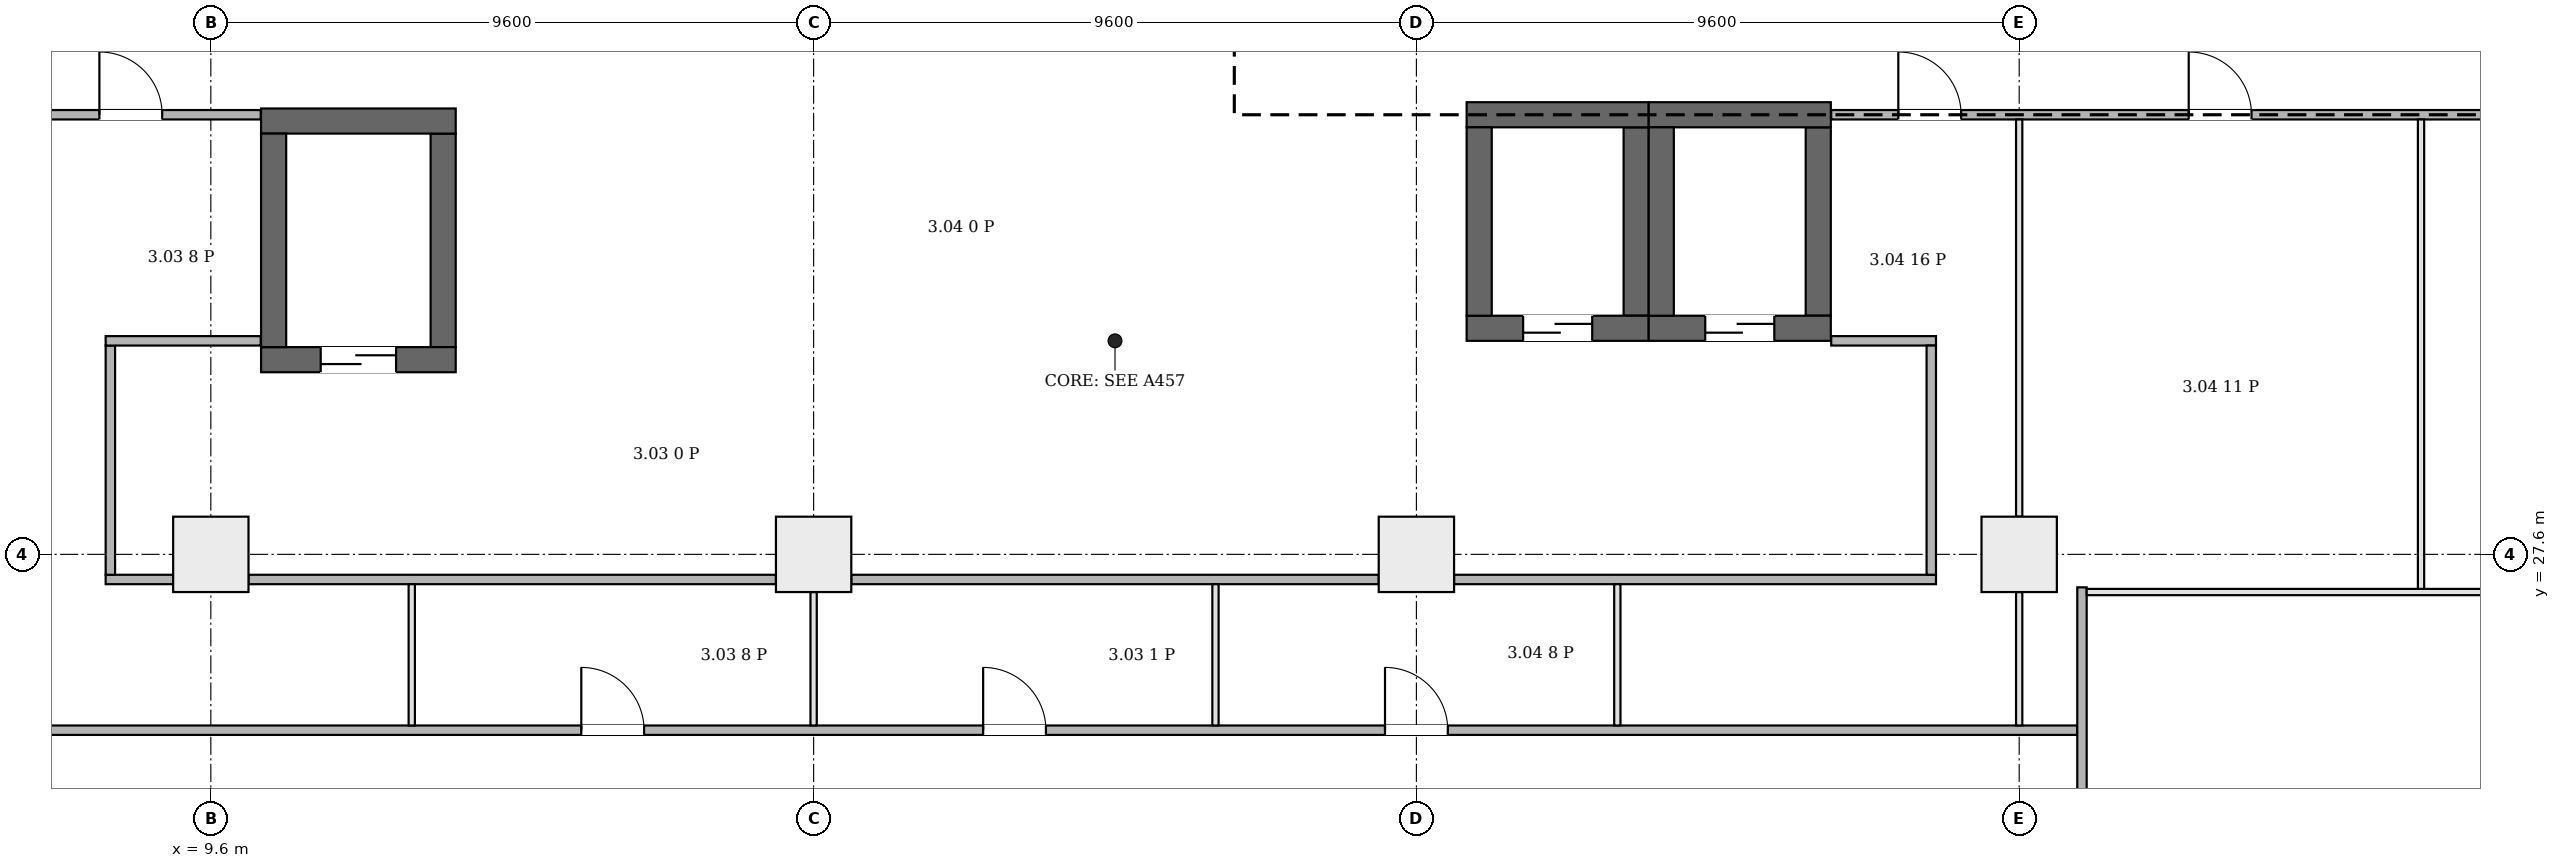
"""IFC4 building model, lengths in metres.
Left out: names, types, materials, properties, quantities, classifications, styles, units other than length and angle.
Written with IfcOpenShell. Run it as: python <this file> out.ifc"""

import sys

from ifc_helpers import new_model, si_unit, direction, frame, frame_2d, origin, origin_2d, place, context, subcontext, project, spatial, rectangle, extrude, element, fill, save


model = new_model("IFC4")
c1 = context("Model", 3, precision=1e-05, world=origin(), true_north=direction((0.0, 1.0)))
c2 = subcontext(c1, "Body", "Model", "MODEL_VIEW")
j1 = project(units=[si_unit("LENGTHUNIT", "METRE"), si_unit("PLANEANGLEUNIT", "RADIAN")], contexts=[c1])
p1 = place(None, origin())
s1 = spatial("IfcSite", under=j1, at=p1, CompositionType="ELEMENT")
p2 = place(p1, origin())
s2 = spatial("IfcBuilding", under=s1, at=p2, CompositionType="ELEMENT")
p3 = place(p2, frame((0.0, 0.0, 21.7)))
s3 = spatial("IfcBuildingStorey", under=s2, at=p3, CompositionType="ELEMENT", Elevation=21.7)
p4 = place(p3, frame((10.4, 30.7, 0.0), z_axis=(0.0, 0.0, 1.0), x_axis=(1.0, 0.0, 0.0)))
e1 = element("IfcWall", 1, at=p4, inside=s3, PredefinedType="SHEAR", context=c2, shape_type="SweptSolid", body=[
    extrude(rectangle(XDim=3.1, YDim=0.4, at=frame_2d((1.55, 0.0))), origin(), (0.0, 0.0, 1.0), 5.0),
])
p5 = place(p4, frame((0.95, 0.0, 0.0)))
e2 = element("IfcOpeningElement", 2, at=p5, cuts=e1, PredefinedType="OPENING", context=c2, shape_type="SweptSolid", body=[
    extrude(rectangle(XDim=1.2, YDim=2.1, at=frame_2d((0.6, 1.05))), frame((0.0, 0.21, 0.0), z_axis=(0.0, -1.0, 0.0), x_axis=(1.0, 0.0, 0.0)), (0.0, 0.0, 1.0), 0.42),
])
p6 = place(p3, frame((10.4, 34.5, 0.0), z_axis=(0.0, 0.0, 1.0), x_axis=(1.0, 0.0, 0.0)))
e3 = element("IfcWall", 3, at=p6, inside=s3, PredefinedType="SHEAR", context=c2, shape_type="SweptSolid", body=[
    extrude(rectangle(XDim=3.1, YDim=0.4, at=frame_2d((1.55, 0.0))), origin(), (0.0, 0.0, 1.0), 5.0),
])
for number, where, z_axis, x_axis in (
    (4, (10.6, 30.9, 0.0), (0.0, 0.0, 1.0), (0.0, 1.0, 0.0)),
    (5, (13.3, 30.9, 0.0), (0.0, 0.0, 1.0), (0.0, 1.0, 0.0)),
):
    element("IfcWall", number, at=place(p3, frame(where, z_axis=z_axis, x_axis=x_axis)), inside=s3, PredefinedType="SHEAR", context=c2, shape_type="SweptSolid", body=[
        extrude(rectangle(XDim=3.4, YDim=0.4, at=frame_2d((1.7, 0.0))), origin(), (0.0, 0.0, 1.0), 5.0),
    ])
p7 = place(p3, frame((29.6, 31.2, 0.0), z_axis=(0.0, 0.0, 1.0), x_axis=(1.0, 0.0, 0.0)))
e6 = element("IfcWall", 6, at=p7, inside=s3, PredefinedType="SHEAR", context=c2, shape_type="SweptSolid", body=[
    extrude(rectangle(XDim=2.9, YDim=0.4, at=frame_2d((1.45, 0.0))), origin(), (0.0, 0.0, 1.0), 5.0),
])
p8 = place(p7, frame((0.9, 0.0, 0.0)))
e7 = element("IfcOpeningElement", 7, at=p8, cuts=e6, PredefinedType="OPENING", context=c2, shape_type="SweptSolid", body=[
    extrude(rectangle(XDim=1.1, YDim=2.1, at=frame_2d((0.55, 1.05))), frame((0.0, 0.21, 0.0), z_axis=(0.0, -1.0, 0.0), x_axis=(1.0, 0.0, 0.0)), (0.0, 0.0, 1.0), 0.42),
])
p9 = place(p3, frame((29.6, 34.6, 0.0), z_axis=(0.0, 0.0, 1.0), x_axis=(1.0, 0.0, 0.0)))
e8 = element("IfcWall", 8, at=p9, inside=s3, PredefinedType="SHEAR", context=c2, shape_type="SweptSolid", body=[
    extrude(rectangle(XDim=2.9, YDim=0.4, at=frame_2d((1.45, 0.0))), origin(), (0.0, 0.0, 1.0), 5.0),
])
for number, where, z_axis, x_axis in (
    (9, (29.8, 31.4, 0.0), (0.0, 0.0, 1.0), (0.0, 1.0, 0.0)),
    (10, (32.3, 31.4, 0.0), (0.0, 0.0, 1.0), (0.0, 1.0, 0.0)),
):
    element("IfcWall", number, at=place(p3, frame(where, z_axis=z_axis, x_axis=x_axis)), inside=s3, PredefinedType="SHEAR", context=c2, shape_type="SweptSolid", body=[
        extrude(rectangle(XDim=3.0, YDim=0.4, at=frame_2d((1.5, 0.0))), origin(), (0.0, 0.0, 1.0), 5.0),
    ])
p10 = place(p3, frame((32.5, 31.2, 0.0), z_axis=(0.0, 0.0, 1.0), x_axis=(1.0, 0.0, 0.0)))
e11 = element("IfcWall", 11, at=p10, inside=s3, PredefinedType="SHEAR", context=c2, shape_type="SweptSolid", body=[
    extrude(rectangle(XDim=2.9, YDim=0.4, at=frame_2d((1.45, 0.0))), origin(), (0.0, 0.0, 1.0), 5.0),
])
p11 = place(p10, frame((0.9, 0.0, 0.0)))
e12 = element("IfcOpeningElement", 12, at=p11, cuts=e11, PredefinedType="OPENING", context=c2, shape_type="SweptSolid", body=[
    extrude(rectangle(XDim=1.1, YDim=2.1, at=frame_2d((0.55, 1.05))), frame((0.0, 0.21, 0.0), z_axis=(0.0, -1.0, 0.0), x_axis=(1.0, 0.0, 0.0)), (0.0, 0.0, 1.0), 0.42),
])
p12 = place(p3, frame((32.5, 34.6, 0.0), z_axis=(0.0, 0.0, 1.0), x_axis=(1.0, 0.0, 0.0)))
e13 = element("IfcWall", 13, at=p12, inside=s3, PredefinedType="SHEAR", context=c2, shape_type="SweptSolid", body=[
    extrude(rectangle(XDim=2.9, YDim=0.4, at=frame_2d((1.45, 0.0))), origin(), (0.0, 0.0, 1.0), 5.0),
])
for number, where, z_axis, x_axis in (
    (14, (32.7, 31.4, 0.0), (0.0, 0.0, 1.0), (0.0, 1.0, 0.0)),
    (15, (35.2, 31.4, 0.0), (0.0, 0.0, 1.0), (0.0, 1.0, 0.0)),
):
    element("IfcWall", number, at=place(p3, frame(where, z_axis=z_axis, x_axis=x_axis)), inside=s3, PredefinedType="SHEAR", context=c2, shape_type="SweptSolid", body=[
        extrude(rectangle(XDim=3.0, YDim=0.4, at=frame_2d((1.5, 0.0))), origin(), (0.0, 0.0, 1.0), 5.0),
    ])
for number, where, z_axis, x_axis in (
    (16, (9.6, 27.6, 0.0), (0.0, 0.0, 1.0), (1.0, 0.0, 0.0)),
    (17, (19.2, 27.6, 0.0), (0.0, 0.0, 1.0), (1.0, 0.0, 0.0)),
    (18, (28.8, 27.6, 0.0), (0.0, 0.0, 1.0), (1.0, 0.0, 0.0)),
    (19, (38.4, 27.6, 0.0), (0.0, 0.0, 1.0), (1.0, 0.0, 0.0)),
):
    element("IfcColumn", number, at=place(p3, frame(where, z_axis=z_axis, x_axis=x_axis)), inside=s3, PredefinedType="COLUMN", context=c2, shape_type="SweptSolid", body=[
        extrude(rectangle(XDim=1.2, YDim=1.2, at=origin_2d()), origin(), (0.0, 0.0, 1.0), 5.0),
    ])
p13 = place(p3, frame((0.206, 24.8, 0.0), z_axis=(0.0, 0.0, 1.0), x_axis=(1.0, 0.0, 0.0)))
e20 = element("IfcWall", 20, at=p13, inside=s3, PredefinedType="PARTITIONING", context=c2, shape_type="SweptSolid", body=[
    extrude(rectangle(XDim=39.119, YDim=0.15, at=frame_2d((19.56, 0.0))), origin(), (0.0, 0.0, 1.0), 4.65),
])
p14 = place(p13, frame((15.294, 0.0, 0.0)))
e21 = element("IfcOpeningElement", 21, at=p14, cuts=e20, PredefinedType="OPENING", context=c2, shape_type="SweptSolid", body=[
    extrude(rectangle(XDim=1.0, YDim=2.1, at=frame_2d((0.5, 1.05))), frame((0.0, 0.085, 0.0), z_axis=(0.0, -1.0, 0.0), x_axis=(1.0, 0.0, 0.0)), (0.0, 0.0, 1.0), 0.17),
])
p15 = place(p13, frame((21.694, 0.0, 0.0)))
e22 = element("IfcOpeningElement", 22, at=p15, cuts=e20, PredefinedType="OPENING", context=c2, shape_type="SweptSolid", body=[
    extrude(rectangle(XDim=1.0, YDim=2.1, at=frame_2d((0.5, 1.05))), frame((0.0, 0.085, 0.0), z_axis=(0.0, -1.0, 0.0), x_axis=(1.0, 0.0, 0.0)), (0.0, 0.0, 1.0), 0.17),
])
p16 = place(p13, frame((28.094, 0.0, 0.0)))
e23 = element("IfcOpeningElement", 23, at=p16, cuts=e20, PredefinedType="OPENING", context=c2, shape_type="SweptSolid", body=[
    extrude(rectangle(XDim=1.0, YDim=2.1, at=frame_2d((0.5, 1.05))), frame((0.0, 0.085, 0.0), z_axis=(0.0, -1.0, 0.0), x_axis=(1.0, 0.0, 0.0)), (0.0, 0.0, 1.0), 0.17),
])
p17 = place(p3, frame((2.706, 34.6, 0.0), z_axis=(0.0, 0.0, 1.0), x_axis=(1.0, 0.0, 0.0)))
e24 = element("IfcWall", 24, at=p17, inside=s3, PredefinedType="PARTITIONING", context=c2, shape_type="SweptSolid", body=[
    extrude(rectangle(XDim=7.688, YDim=0.15, at=frame_2d((3.844, 0.0))), origin(), (0.0, 0.0, 1.0), 4.65),
])
p18 = place(p17, frame((2.194, 0.0, 0.0)))
e25 = element("IfcOpeningElement", 25, at=p18, cuts=e24, PredefinedType="OPENING", context=c2, shape_type="SweptSolid", body=[
    extrude(rectangle(XDim=1.0, YDim=2.1, at=frame_2d((0.5, 1.05))), frame((0.0, 0.085, 0.0), z_axis=(0.0, -1.0, 0.0), x_axis=(1.0, 0.0, 0.0)), (0.0, 0.0, 1.0), 0.17),
])
p19 = place(p17, frame((5.119, 0.0, 0.0)))
e26 = element("IfcOpeningElement", 26, at=p19, cuts=e24, PredefinedType="OPENING", context=c2, shape_type="SweptSolid", body=[
    extrude(rectangle(XDim=1.0, YDim=2.1, at=frame_2d((0.5, 1.05))), frame((0.0, 0.085, 0.0), z_axis=(0.0, -1.0, 0.0), x_axis=(1.0, 0.0, 0.0)), (0.0, 0.0, 1.0), 0.17),
])
p20 = place(p3, frame((7.925, 27.2, 0.0), z_axis=(0.0, 0.0, 1.0), x_axis=(1.0, 0.0, 0.0)))
e27 = element("IfcWall", 27, at=p20, inside=s3, PredefinedType="PARTITIONING", context=c2, shape_type="SweptSolid", body=[
    extrude(rectangle(XDim=1.075, YDim=0.15, at=frame_2d((0.538, 0.0))), origin(), (0.0, 0.0, 1.0), 4.65),
])
p21 = place(p3, frame((8.0, 27.275, 0.0), z_axis=(0.0, 0.0, 1.0), x_axis=(0.0, 1.0, 0.0)))
e28 = element("IfcWall", 28, at=p21, inside=s3, PredefinedType="PARTITIONING", context=c2, shape_type="SweptSolid", body=[
    extrude(rectangle(XDim=3.65, YDim=0.15, at=frame_2d((1.825, 0.0))), origin(), (0.0, 0.0, 1.0), 4.65),
])
p22 = place(p3, frame((7.925, 31.0, 0.0), z_axis=(0.0, 0.0, 1.0), x_axis=(1.0, 0.0, 0.0)))
e29 = element("IfcWall", 29, at=p22, inside=s3, PredefinedType="PARTITIONING", context=c2, shape_type="SweptSolid", body=[
    extrude(rectangle(XDim=2.469, YDim=0.15, at=frame_2d((1.234, 0.0))), origin(), (0.0, 0.0, 1.0), 4.65),
])
p23 = place(p3, frame((10.2, 27.2, 0.0), z_axis=(0.0, 0.0, 1.0), x_axis=(1.0, 0.0, 0.0)))
e30 = element("IfcWall", 30, at=p23, inside=s3, PredefinedType="PARTITIONING", context=c2, shape_type="SweptSolid", body=[
    extrude(rectangle(XDim=8.4, YDim=0.15, at=frame_2d((4.2, 0.0))), origin(), (0.0, 0.0, 1.0), 4.65),
])
p24 = place(p3, frame((12.8, 24.875, 0.0), z_axis=(0.0, 0.0, 1.0), x_axis=(0.0, 1.0, 0.0)))
e31 = element("IfcWall", 31, at=p24, inside=s3, PredefinedType="PARTITIONING", context=c2, shape_type="SweptSolid", body=[
    extrude(rectangle(XDim=2.25, YDim=0.1, at=frame_2d((1.125, 0.0))), origin(), (0.0, 0.0, 1.0), 4.65),
])
p25 = place(p3, frame((19.2, 24.875, 0.0), z_axis=(0.0, 0.0, 1.0), x_axis=(0.0, 1.0, 0.0)))
e32 = element("IfcWall", 32, at=p25, inside=s3, PredefinedType="PARTITIONING", context=c2, shape_type="SweptSolid", body=[
    extrude(rectangle(XDim=2.125, YDim=0.1, at=frame_2d((1.062, 0.0))), origin(), (0.0, 0.0, 1.0), 4.25),
])
p26 = place(p3, frame((19.8, 27.2, 0.0), z_axis=(0.0, 0.0, 1.0), x_axis=(1.0, 0.0, 0.0)))
e33 = element("IfcWall", 33, at=p26, inside=s3, PredefinedType="PARTITIONING", context=c2, shape_type="SweptSolid", body=[
    extrude(rectangle(XDim=8.4, YDim=0.15, at=frame_2d((4.2, 0.0))), origin(), (0.0, 0.0, 1.0), 4.65),
])
p27 = place(p3, frame((25.6, 24.875, 0.0), z_axis=(0.0, 0.0, 1.0), x_axis=(0.0, 1.0, 0.0)))
e34 = element("IfcWall", 34, at=p27, inside=s3, PredefinedType="PARTITIONING", context=c2, shape_type="SweptSolid", body=[
    extrude(rectangle(XDim=2.25, YDim=0.1, at=frame_2d((1.125, 0.0))), origin(), (0.0, 0.0, 1.0), 4.65),
])
p28 = place(p3, frame((29.4, 27.2, 0.0), z_axis=(0.0, 0.0, 1.0), x_axis=(1.0, 0.0, 0.0)))
e35 = element("IfcWall", 35, at=p28, inside=s3, PredefinedType="PARTITIONING", context=c2, shape_type="SweptSolid", body=[
    extrude(rectangle(XDim=7.675, YDim=0.15, at=frame_2d((3.837, 0.0))), origin(), (0.0, 0.0, 1.0), 4.65),
])
p29 = place(p3, frame((32.0, 24.875, 0.0), z_axis=(0.0, 0.0, 1.0), x_axis=(0.0, 1.0, 0.0)))
e36 = element("IfcWall", 36, at=p29, inside=s3, PredefinedType="PARTITIONING", context=c2, shape_type="SweptSolid", body=[
    extrude(rectangle(XDim=2.25, YDim=0.1, at=frame_2d((1.125, 0.0))), origin(), (0.0, 0.0, 1.0), 4.65),
])
p30 = place(p3, frame((35.406, 31.0, 0.0), z_axis=(0.0, 0.0, 1.0), x_axis=(1.0, 0.0, 0.0)))
e37 = element("IfcWall", 37, at=p30, inside=s3, PredefinedType="PARTITIONING", context=c2, shape_type="SweptSolid", body=[
    extrude(rectangle(XDim=1.669, YDim=0.15, at=frame_2d((0.834, 0.0))), origin(), (0.0, 0.0, 1.0), 4.65),
])
p31 = place(p3, frame((35.406, 34.6, 0.0), z_axis=(0.0, 0.0, 1.0), x_axis=(1.0, 0.0, 0.0)))
e38 = element("IfcWall", 38, at=p31, inside=s3, PredefinedType="PARTITIONING", context=c2, shape_type="SweptSolid", body=[
    extrude(rectangle(XDim=21.988, YDim=0.15, at=frame_2d((10.994, 0.0))), origin(), (0.0, 0.0, 1.0), 4.65),
])
p32 = place(p31, frame((1.069, 0.0, 0.0)))
e39 = element("IfcOpeningElement", 39, at=p32, cuts=e38, PredefinedType="OPENING", context=c2, shape_type="SweptSolid", body=[
    extrude(rectangle(XDim=1.0, YDim=2.1, at=frame_2d((0.5, 1.05))), frame((0.0, 0.085, 0.0), z_axis=(0.0, -1.0, 0.0), x_axis=(1.0, 0.0, 0.0)), (0.0, 0.0, 1.0), 0.17),
])
p33 = place(p31, frame((5.694, 0.0, 0.0)))
e40 = element("IfcOpeningElement", 40, at=p33, cuts=e38, PredefinedType="OPENING", context=c2, shape_type="SweptSolid", body=[
    extrude(rectangle(XDim=1.0, YDim=2.1, at=frame_2d((0.5, 1.05))), frame((0.0, 0.085, 0.0), z_axis=(0.0, -1.0, 0.0), x_axis=(1.0, 0.0, 0.0)), (0.0, 0.0, 1.0), 0.17),
])
p34 = place(p31, frame((12.094, 0.0, 0.0)))
e41 = element("IfcOpeningElement", 41, at=p34, cuts=e38, PredefinedType="OPENING", context=c2, shape_type="SweptSolid", body=[
    extrude(rectangle(XDim=1.0, YDim=2.1, at=frame_2d((0.5, 1.05))), frame((0.0, 0.085, 0.0), z_axis=(0.0, -1.0, 0.0), x_axis=(1.0, 0.0, 0.0)), (0.0, 0.0, 1.0), 0.17),
])
p35 = place(p31, frame((18.318, 0.0, 0.0)))
e42 = element("IfcOpeningElement", 42, at=p35, cuts=e38, PredefinedType="OPENING", context=c2, shape_type="SweptSolid", body=[
    extrude(rectangle(XDim=1.0, YDim=2.1, at=frame_2d((0.5, 1.05))), frame((0.0, 0.085, 0.0), z_axis=(0.0, -1.0, 0.0), x_axis=(1.0, 0.0, 0.0)), (0.0, 0.0, 1.0), 0.17),
])
p36 = place(p3, frame((37.0, 27.275, 0.0), z_axis=(0.0, 0.0, 1.0), x_axis=(0.0, 1.0, 0.0)))
e43 = element("IfcWall", 43, at=p36, inside=s3, PredefinedType="PARTITIONING", context=c2, shape_type="SweptSolid", body=[
    extrude(rectangle(XDim=3.65, YDim=0.15, at=frame_2d((1.825, 0.0))), origin(), (0.0, 0.0, 1.0), 4.65),
])
p37 = place(p3, frame((38.4, 24.875, 0.0), z_axis=(0.0, 0.0, 1.0), x_axis=(0.0, 1.0, 0.0)))
e44 = element("IfcWall", 44, at=p37, inside=s3, PredefinedType="PARTITIONING", context=c2, shape_type="SweptSolid", body=[
    extrude(rectangle(XDim=2.125, YDim=0.1, at=frame_2d((1.062, 0.0))), origin(), (0.0, 0.0, 1.0), 4.25),
])
p38 = place(p3, frame((38.4, 28.2, 0.0), z_axis=(0.0, 0.0, 1.0), x_axis=(0.0, 1.0, 0.0)))
e45 = element("IfcWall", 45, at=p38, inside=s3, PredefinedType="PARTITIONING", context=c2, shape_type="SweptSolid", body=[
    extrude(rectangle(XDim=6.325, YDim=0.1, at=frame_2d((3.163, 0.0))), origin(), (0.0, 0.0, 1.0), 4.25),
])
p39 = place(p3, frame((39.4, 19.075, 0.0), z_axis=(0.0, 0.0, 1.0), x_axis=(0.0, 1.0, 0.0)))
e46 = element("IfcWall", 46, at=p39, inside=s3, PredefinedType="PARTITIONING", context=c2, shape_type="SweptSolid", body=[
    extrude(rectangle(XDim=8.0, YDim=0.15, at=frame_2d((4.0, 0.0))), origin(), (0.0, 0.0, 1.0), 4.65),
])
p40 = place(p39, frame((3.425, 0.0, 0.0)))
e47 = element("IfcOpeningElement", 47, at=p40, cuts=e46, PredefinedType="OPENING", context=c2, shape_type="SweptSolid", body=[
    extrude(rectangle(XDim=1.0, YDim=2.1, at=frame_2d((0.5, 1.05))), frame((0.0, 0.085, 0.0), z_axis=(0.0, -1.0, 0.0), x_axis=(1.0, 0.0, 0.0)), (0.0, 0.0, 1.0), 0.17),
])
p41 = place(p3, frame((39.475, 27.0, 0.0), z_axis=(0.0, 0.0, 1.0), x_axis=(1.0, 0.0, 0.0)))
e48 = element("IfcWall", 48, at=p41, inside=s3, PredefinedType="PARTITIONING", context=c2, shape_type="SweptSolid", body=[
    extrude(rectangle(XDim=7.925, YDim=0.1, at=frame_2d((3.962, 0.0))), origin(), (0.0, 0.0, 1.0), 4.65),
])
p42 = place(p3, frame((44.8, 27.05, 0.0), z_axis=(0.0, 0.0, 1.0), x_axis=(0.0, 1.0, 0.0)))
e49 = element("IfcWall", 49, at=p42, inside=s3, PredefinedType="PARTITIONING", context=c2, shape_type="SweptSolid", body=[
    extrude(rectangle(XDim=7.475, YDim=0.1, at=frame_2d((3.737, 0.0))), origin(), (0.0, 0.0, 1.0), 4.65),
])
p43 = place(p5, origin())
e50 = element("IfcDoor", 50, at=p43, inside=s3, OperationType="DOUBLE_DOOR_SLIDING", PredefinedType="DOOR", context=c2, shape_type="SweptSolid", body=[
    extrude(rectangle(XDim=1.2, YDim=2.1, at=frame_2d((0.6, 1.05))), frame((0.0, 0.025, 0.0), z_axis=(0.0, -1.0, 0.0), x_axis=(1.0, 0.0, 0.0)), (0.0, 0.0, 1.0), 0.05),
])
fill(e2, e50)
p44 = place(p8, origin())
e51 = element("IfcDoor", 51, at=p44, inside=s3, OperationType="DOUBLE_DOOR_SLIDING", PredefinedType="DOOR", context=c2, shape_type="SweptSolid", body=[
    extrude(rectangle(XDim=1.1, YDim=2.1, at=frame_2d((0.55, 1.05))), frame((0.0, 0.025, 0.0), z_axis=(0.0, -1.0, 0.0), x_axis=(1.0, 0.0, 0.0)), (0.0, 0.0, 1.0), 0.05),
])
fill(e7, e51)
p45 = place(p11, origin())
e52 = element("IfcDoor", 52, at=p45, inside=s3, OperationType="DOUBLE_DOOR_SLIDING", PredefinedType="DOOR", context=c2, shape_type="SweptSolid", body=[
    extrude(rectangle(XDim=1.1, YDim=2.1, at=frame_2d((0.55, 1.05))), frame((0.0, 0.025, 0.0), z_axis=(0.0, -1.0, 0.0), x_axis=(1.0, 0.0, 0.0)), (0.0, 0.0, 1.0), 0.05),
])
fill(e12, e52)
p46 = place(p19, origin())
e53 = element("IfcDoor", 53, at=p46, inside=s3, OperationType="SINGLE_SWING_LEFT", PredefinedType="DOOR", context=c2, shape_type="SweptSolid", body=[
    extrude(rectangle(XDim=1.0, YDim=2.1, at=frame_2d((0.5, 1.05))), frame((0.0, 0.025, 0.0), z_axis=(0.0, -1.0, 0.0), x_axis=(1.0, 0.0, 0.0)), (0.0, 0.0, 1.0), 0.05),
])
fill(e26, e53)
p47 = place(p14, origin())
e54 = element("IfcDoor", 54, at=p47, inside=s3, OperationType="SINGLE_SWING_LEFT", PredefinedType="DOOR", context=c2, shape_type="SweptSolid", body=[
    extrude(rectangle(XDim=1.0, YDim=2.1, at=frame_2d((0.5, 1.05))), frame((0.0, 0.025, 0.0), z_axis=(0.0, -1.0, 0.0), x_axis=(1.0, 0.0, 0.0)), (0.0, 0.0, 1.0), 0.05),
])
fill(e21, e54)
p48 = place(p15, origin())
e55 = element("IfcDoor", 55, at=p48, inside=s3, OperationType="SINGLE_SWING_RIGHT", PredefinedType="DOOR", context=c2, shape_type="SweptSolid", body=[
    extrude(rectangle(XDim=1.0, YDim=2.1, at=frame_2d((0.5, 1.05))), frame((0.0, 0.025, 0.0), z_axis=(0.0, -1.0, 0.0), x_axis=(1.0, 0.0, 0.0)), (0.0, 0.0, 1.0), 0.05),
])
fill(e22, e55)
p49 = place(p16, origin())
e56 = element("IfcDoor", 56, at=p49, inside=s3, OperationType="SINGLE_SWING_RIGHT", PredefinedType="DOOR", context=c2, shape_type="SweptSolid", body=[
    extrude(rectangle(XDim=1.0, YDim=2.1, at=frame_2d((0.5, 1.05))), frame((0.0, 0.025, 0.0), z_axis=(0.0, -1.0, 0.0), x_axis=(1.0, 0.0, 0.0)), (0.0, 0.0, 1.0), 0.05),
])
fill(e23, e56)
p50 = place(p32, origin())
e57 = element("IfcDoor", 57, at=p50, inside=s3, OperationType="SINGLE_SWING_RIGHT", PredefinedType="DOOR", context=c2, shape_type="SweptSolid", body=[
    extrude(rectangle(XDim=1.0, YDim=2.1, at=frame_2d((0.5, 1.05))), frame((0.0, 0.025, 0.0), z_axis=(0.0, -1.0, 0.0), x_axis=(1.0, 0.0, 0.0)), (0.0, 0.0, 1.0), 0.05),
])
fill(e39, e57)
p51 = place(p33, origin())
e58 = element("IfcDoor", 58, at=p51, inside=s3, OperationType="SINGLE_SWING_RIGHT", PredefinedType="DOOR", context=c2, shape_type="SweptSolid", body=[
    extrude(rectangle(XDim=1.0, YDim=2.1, at=frame_2d((0.5, 1.05))), frame((0.0, 0.025, 0.0), z_axis=(0.0, -1.0, 0.0), x_axis=(1.0, 0.0, 0.0)), (0.0, 0.0, 1.0), 0.05),
])
fill(e40, e58)
save(model, sys.argv[1])
